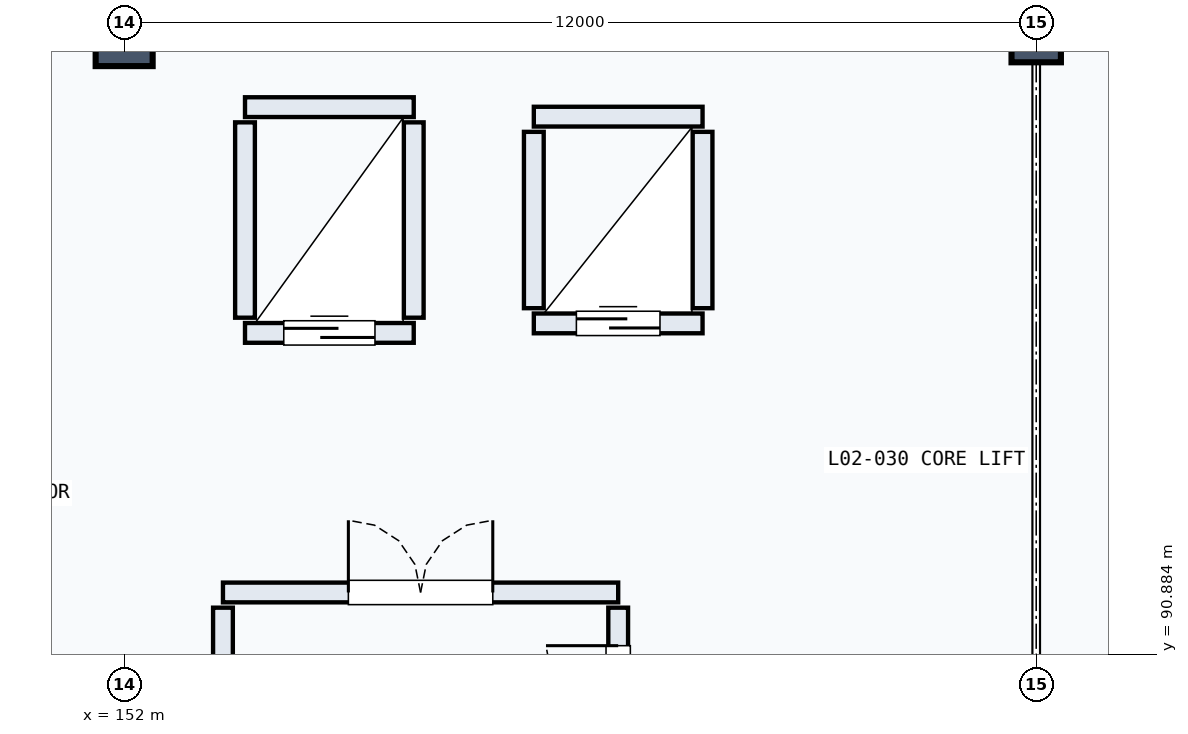
"""IFC4 building model, lengths in metres.
Left out: names, types, materials, properties, quantities, classifications, styles, units other than length and angle.
Written with IfcOpenShell. Run it as: python <this file> out.ifc"""

import sys

from ifc_helpers import new_model, si_unit, direction, frame, frame_2d, origin, origin_2d, place, context, subcontext, project, spatial, rectangle, circle, extrude, element, fill, save


model = new_model("IFC4")
c1 = context("Model", 3, precision=1e-05, world=origin(), true_north=direction((0.0, 1.0)))
c2 = subcontext(c1, "Body", "Model", "MODEL_VIEW")
j1 = project(units=[si_unit("LENGTHUNIT", "METRE"), si_unit("PLANEANGLEUNIT", "RADIAN")], contexts=[c1])
p1 = place(None, origin())
s1 = spatial("IfcSite", under=j1, at=p1, CompositionType="ELEMENT")
p2 = place(p1, origin())
s2 = spatial("IfcBuilding", under=s1, at=p2, CompositionType="ELEMENT")
p3 = place(p2, frame((0.0, 0.0, 10.2)))
s3 = spatial("IfcBuildingStorey", under=s2, at=p3, CompositionType="ELEMENT", Elevation=10.2)
p4 = place(p3, frame((152.0, 99.0, 0.0), z_axis=(0.0, 0.0, 1.0), x_axis=(1.0, 0.0, 0.0)))
e1 = element("IfcColumn", 1, at=p4, inside=s3, PredefinedType="COLUMN", context=c2, shape_type="SweptSolid", body=[
    extrude(circle(Radius=0.375, at=origin_2d()), origin(), (0.0, 0.0, 1.0), 4.5),
])
p5 = place(p3, frame((164.0, 99.0, 0.0), z_axis=(0.0, 0.0, 1.0), x_axis=(1.0, 0.0, 0.0)))
e2 = element("IfcColumn", 2, at=p5, inside=s3, PredefinedType="COLUMN", context=c2, shape_type="SweptSolid", body=[
    extrude(circle(Radius=0.325, at=origin_2d()), origin(), (0.0, 0.0, 1.0), 4.5),
])
p6 = place(p3, frame((153.59, 95.115, 0.0), z_axis=(0.0, 0.0, 1.0), x_axis=(1.0, 0.0, 0.0)))
e3 = element("IfcWall", 3, at=p6, inside=s3, PredefinedType="SOLIDWALL", context=c2, shape_type="SweptSolid", body=[
    extrude(rectangle(XDim=2.22, YDim=0.26, at=frame_2d((1.11, 0.0))), origin(), (0.0, 0.0, 1.0), 4.14),
])
p7 = place(p6, frame((0.51, 0.0, 0.0)))
e4 = element("IfcOpeningElement", 4, at=p7, cuts=e3, PredefinedType="OPENING", context=c2, shape_type="SweptSolid", body=[
    extrude(rectangle(XDim=1.2, YDim=2.2, at=frame_2d((0.6, 1.1))), frame((0.0, 0.14, 0.0), z_axis=(0.0, -1.0, 0.0), x_axis=(1.0, 0.0, 0.0)), (0.0, 0.0, 1.0), 0.28),
])
p8 = place(p3, frame((153.59, 98.085, 0.0), z_axis=(0.0, 0.0, 1.0), x_axis=(1.0, 0.0, 0.0)))
e5 = element("IfcWall", 5, at=p8, inside=s3, PredefinedType="SOLIDWALL", context=c2, shape_type="SweptSolid", body=[
    extrude(rectangle(XDim=2.22, YDim=0.26, at=frame_2d((1.11, 0.0))), origin(), (0.0, 0.0, 1.0), 4.14),
])
for number, where, z_axis, x_axis in (
    (6, (153.59, 95.315, 0.0), (0.0, 0.0, 1.0), (0.0, 1.0, 0.0)),
    (7, (155.81, 95.315, 0.0), (0.0, 0.0, 1.0), (0.0, 1.0, 0.0)),
):
    element("IfcWall", number, at=place(p3, frame(where, z_axis=z_axis, x_axis=x_axis)), inside=s3, PredefinedType="SOLIDWALL", context=c2, shape_type="SweptSolid", body=[
        extrude(rectangle(XDim=2.57, YDim=0.26, at=frame_2d((1.285, 0.0))), origin(), (0.0, 0.0, 1.0), 4.14),
    ])
p9 = place(p3, frame((157.39, 95.24, 0.0), z_axis=(0.0, 0.0, 1.0), x_axis=(1.0, 0.0, 0.0)))
e8 = element("IfcWall", 8, at=p9, inside=s3, PredefinedType="SOLIDWALL", context=c2, shape_type="SweptSolid", body=[
    extrude(rectangle(XDim=2.22, YDim=0.26, at=frame_2d((1.11, 0.0))), origin(), (0.0, 0.0, 1.0), 4.14),
])
p10 = place(p9, frame((0.56, 0.0, 0.0)))
e9 = element("IfcOpeningElement", 9, at=p10, cuts=e8, PredefinedType="OPENING", context=c2, shape_type="SweptSolid", body=[
    extrude(rectangle(XDim=1.1, YDim=2.15, at=frame_2d((0.55, 1.075))), frame((0.0, 0.14, 0.0), z_axis=(0.0, -1.0, 0.0), x_axis=(1.0, 0.0, 0.0)), (0.0, 0.0, 1.0), 0.28),
])
p11 = place(p3, frame((157.39, 97.96, 0.0), z_axis=(0.0, 0.0, 1.0), x_axis=(1.0, 0.0, 0.0)))
e10 = element("IfcWall", 10, at=p11, inside=s3, PredefinedType="SOLIDWALL", context=c2, shape_type="SweptSolid", body=[
    extrude(rectangle(XDim=2.22, YDim=0.26, at=frame_2d((1.11, 0.0))), origin(), (0.0, 0.0, 1.0), 4.14),
])
for number, where, z_axis, x_axis in (
    (11, (157.39, 95.44, 0.0), (0.0, 0.0, 1.0), (0.0, 1.0, 0.0)),
    (12, (159.61, 95.44, 0.0), (0.0, 0.0, 1.0), (0.0, 1.0, 0.0)),
):
    element("IfcWall", number, at=place(p3, frame(where, z_axis=z_axis, x_axis=x_axis)), inside=s3, PredefinedType="SOLIDWALL", context=c2, shape_type="SweptSolid", body=[
        extrude(rectangle(XDim=2.32, YDim=0.26, at=frame_2d((1.16, 0.0))), origin(), (0.0, 0.0, 1.0), 4.14),
    ])
p12 = place(p3, frame((153.3, 91.7, 0.0), z_axis=(0.0, 0.0, 1.0), x_axis=(1.0, 0.0, 0.0)))
e13 = element("IfcWall", 13, at=p12, inside=s3, PredefinedType="SOLIDWALL", context=c2, shape_type="SweptSolid", body=[
    extrude(rectangle(XDim=5.2, YDim=0.26, at=frame_2d((2.6, 0.0))), origin(), (0.0, 0.0, 1.0), 4.14),
])
p13 = place(p12, frame((1.65, 0.0, 0.0)))
e14 = element("IfcOpeningElement", 14, at=p13, cuts=e13, PredefinedType="OPENING", context=c2, shape_type="SweptSolid", body=[
    extrude(rectangle(XDim=1.9, YDim=2.2, at=frame_2d((0.95, 1.1))), frame((0.0, 0.14, 0.0), z_axis=(0.0, -1.0, 0.0), x_axis=(1.0, 0.0, 0.0)), (0.0, 0.0, 1.0), 0.28),
])
p14 = place(p3, frame((153.3, 88.6, 0.0), z_axis=(0.0, 0.0, 1.0), x_axis=(0.0, 1.0, 0.0)))
e15 = element("IfcWall", 15, at=p14, inside=s3, PredefinedType="SOLIDWALL", context=c2, shape_type="SweptSolid", body=[
    extrude(rectangle(XDim=2.9, YDim=0.26, at=frame_2d((1.45, 0.0))), origin(), (0.0, 0.0, 1.0), 4.14),
])
p15 = place(p3, frame((158.5, 88.6, 0.0), z_axis=(0.0, 0.0, 1.0), x_axis=(0.0, 1.0, 0.0)))
e16 = element("IfcWall", 16, at=p15, inside=s3, PredefinedType="SOLIDWALL", context=c2, shape_type="SweptSolid", body=[
    extrude(rectangle(XDim=2.9, YDim=0.26, at=frame_2d((1.45, 0.0))), origin(), (0.0, 0.0, 1.0), 4.14),
])
p16 = place(p15, frame((0.5, 0.0, 0.0)))
e17 = element("IfcOpeningElement", 17, at=p16, cuts=e16, PredefinedType="OPENING", context=c2, shape_type="SweptSolid", body=[
    extrude(rectangle(XDim=1.9, YDim=2.2, at=frame_2d((0.95, 1.1))), frame((0.0, 0.14, 0.0), z_axis=(0.0, -1.0, 0.0), x_axis=(1.0, 0.0, 0.0)), (0.0, 0.0, 1.0), 0.28),
])
p17 = place(p7, origin())
e18 = element("IfcDoor", 18, at=p17, inside=s3, OperationType="SLIDING_TO_LEFT", PredefinedType="DOOR", context=c2, shape_type="SweptSolid", body=[
    extrude(rectangle(XDim=1.2, YDim=2.2, at=frame_2d((0.6, 1.1))), frame((0.0, 0.025, 0.0), z_axis=(0.0, -1.0, 0.0), x_axis=(1.0, 0.0, 0.0)), (0.0, 0.0, 1.0), 0.05),
])
fill(e4, e18)
p18 = place(p10, origin())
e19 = element("IfcDoor", 19, at=p18, inside=s3, OperationType="SLIDING_TO_LEFT", PredefinedType="DOOR", context=c2, shape_type="SweptSolid", body=[
    extrude(rectangle(XDim=1.1, YDim=2.15, at=frame_2d((0.55, 1.075))), frame((0.0, 0.025, 0.0), z_axis=(0.0, -1.0, 0.0), x_axis=(1.0, 0.0, 0.0)), (0.0, 0.0, 1.0), 0.05),
])
fill(e9, e19)
p19 = place(p13, origin())
e20 = element("IfcDoor", 20, at=p19, inside=s3, OperationType="DOUBLE_DOOR_SINGLE_SWING", PredefinedType="DOOR", context=c2, shape_type="SweptSolid", body=[
    extrude(rectangle(XDim=1.9, YDim=2.2, at=frame_2d((0.95, 1.1))), frame((0.0, 0.025, 0.0), z_axis=(0.0, -1.0, 0.0), x_axis=(1.0, 0.0, 0.0)), (0.0, 0.0, 1.0), 0.05),
])
fill(e14, e20)
p20 = place(p16, origin())
e21 = element("IfcDoor", 21, at=p20, inside=s3, OperationType="DOUBLE_DOOR_SINGLE_SWING", PredefinedType="DOOR", context=c2, shape_type="SweptSolid", body=[
    extrude(rectangle(XDim=1.9, YDim=2.2, at=frame_2d((0.95, 1.1))), frame((0.0, 0.025, 0.0), z_axis=(0.0, -1.0, 0.0), x_axis=(1.0, 0.0, 0.0)), (0.0, 0.0, 1.0), 0.05),
])
fill(e17, e21)
save(model, sys.argv[1])
